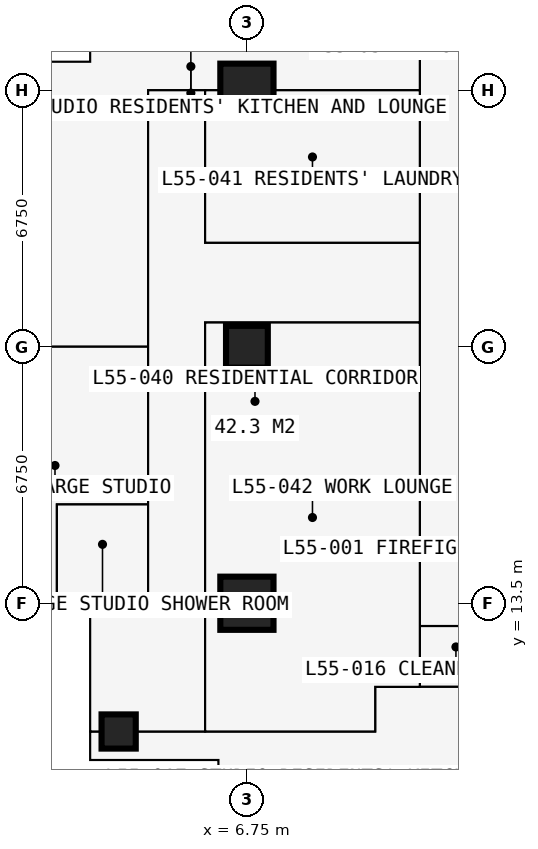
"""IFC4 building model, lengths in metres.
Left out: names, types, materials, properties, quantities, classifications, styles, units other than length and angle.
Written with IfcOpenShell. Run it as: python <this file> out.ifc"""

import sys

from ifc_helpers import new_model, si_unit, direction, frame, frame_2d, origin, origin_2d, place, context, subcontext, project, spatial, rectangle, extrude, element, fill, save


model = new_model("IFC4")
c1 = context("Model", 3, precision=1e-05, world=origin(), true_north=direction((0.0, 1.0)))
c2 = subcontext(c1, "Body", "Model", "MODEL_VIEW")
j1 = project(units=[si_unit("LENGTHUNIT", "METRE"), si_unit("PLANEANGLEUNIT", "RADIAN")], contexts=[c1])
p1 = place(None, origin())
s1 = spatial("IfcSite", under=j1, at=p1, CompositionType="ELEMENT")
p2 = place(p1, origin())
s2 = spatial("IfcBuilding", under=s1, at=p2, CompositionType="ELEMENT")
p3 = place(p2, frame((0.0, 0.0, 204.3)))
s3 = spatial("IfcBuildingStorey", under=s2, at=p3, CompositionType="ELEMENT", Elevation=204.3)
p4 = place(p3, frame((3.375, 10.125, 0.0), z_axis=(0.0, 0.0, 1.0), x_axis=(1.0, 0.0, 0.0)))
e1 = element("IfcColumn", 1, at=p4, inside=s3, PredefinedType="COLUMN", context=c2, shape_type="SweptSolid", body=[
    extrude(rectangle(XDim=0.9, YDim=0.9, at=origin_2d()), origin(), (0.0, 0.0, 1.0), 3.6),
])
p5 = place(p3, frame((6.75, 13.5, 0.0), z_axis=(0.0, 0.0, 1.0), x_axis=(1.0, 0.0, 0.0)))
e2 = element("IfcColumn", 2, at=p5, inside=s3, PredefinedType="COLUMN", context=c2, shape_type="SweptSolid", body=[
    extrude(rectangle(XDim=1.4, YDim=1.4, at=origin_2d()), origin(), (0.0, 0.0, 1.0), 3.6),
])
p6 = place(p3, frame((6.75, 20.25, 0.0), z_axis=(0.0, 0.0, 1.0), x_axis=(1.0, 0.0, 0.0)))
e3 = element("IfcColumn", 3, at=p6, inside=s3, PredefinedType="COLUMN", context=c2, shape_type="SweptSolid", body=[
    extrude(rectangle(XDim=1.1, YDim=1.1, at=origin_2d()), origin(), (0.0, 0.0, 1.0), 3.6),
])
p7 = place(p3, frame((6.75, 27.0, 0.0), z_axis=(0.0, 0.0, 1.0), x_axis=(1.0, 0.0, 0.0)))
e4 = element("IfcColumn", 4, at=p7, inside=s3, PredefinedType="COLUMN", context=c2, shape_type="SweptSolid", body=[
    extrude(rectangle(XDim=1.4, YDim=1.4, at=origin_2d()), origin(), (0.0, 0.0, 1.0), 3.6),
])
p8 = place(p3, frame((2.625, 31.125, 0.0), z_axis=(0.0, 0.0, 1.0), x_axis=(0.0, -1.0, 0.0)))
e5 = element("IfcWall", 5, at=p8, inside=s3, PredefinedType="SOLIDWALL", context=c2, shape_type="SweptSolid", body=[
    extrude(rectangle(XDim=3.375, YDim=0.3, at=frame_2d((1.688, 0.0))), origin(), (0.0, 0.0, 1.0), 3.375),
])
p9 = place(p8, frame((0.788, 0.0, 0.6)))
e6 = element("IfcOpeningElement", 6, at=p9, cuts=e5, PredefinedType="OPENING", context=c2, shape_type="SweptSolid", body=[
    extrude(rectangle(XDim=1.8, YDim=2.1, at=frame_2d((0.9, 1.05))), frame((0.0, 0.16, 0.0), z_axis=(0.0, -1.0, 0.0), x_axis=(1.0, 0.0, 0.0)), (0.0, 0.0, 1.0), 0.32),
])
p10 = place(p3, frame((2.625, 27.75, 0.0), z_axis=(0.0, 0.0, 1.0), x_axis=(-1.0, 0.0, 0.0)))
e7 = element("IfcWall", 7, at=p10, inside=s3, PredefinedType="SOLIDWALL", context=c2, shape_type="SweptSolid", body=[
    extrude(rectangle(XDim=3.375, YDim=0.3, at=frame_2d((1.688, 0.0))), origin(), (0.0, 0.0, 1.0), 3.375),
])
p11 = place(p10, frame((0.242, 0.0, 0.9)))
e8 = element("IfcOpeningElement", 8, at=p11, cuts=e7, PredefinedType="OPENING", context=c2, shape_type="SweptSolid", body=[
    extrude(rectangle(XDim=1.5, YDim=1.8, at=frame_2d((0.75, 0.9))), frame((0.0, 0.16, 0.0), z_axis=(0.0, -1.0, 0.0), x_axis=(1.0, 0.0, 0.0)), (0.0, 0.0, 1.0), 0.32),
])
p12 = place(p3, frame((-0.75, 12.75, 0.0), z_axis=(0.0, 0.0, 1.0), x_axis=(1.0, 0.0, 0.0)))
e9 = element("IfcWall", 9, at=p12, inside=s3, PredefinedType="SOLIDWALL", context=c2, shape_type="SweptSolid", body=[
    extrude(rectangle(XDim=3.375, YDim=0.3, at=frame_2d((1.688, 0.0))), origin(), (0.0, 0.0, 1.0), 3.375),
])
p13 = place(p12, frame((1.633, 0.0, 0.9)))
e10 = element("IfcOpeningElement", 10, at=p13, cuts=e9, PredefinedType="OPENING", context=c2, shape_type="SweptSolid", body=[
    extrude(rectangle(XDim=1.5, YDim=1.8, at=frame_2d((0.75, 0.9))), frame((0.0, 0.16, 0.0), z_axis=(0.0, -1.0, 0.0), x_axis=(1.0, 0.0, 0.0)), (0.0, 0.0, 1.0), 0.32),
])
p14 = place(p3, frame((2.625, 12.75, 0.0), z_axis=(0.0, 0.0, 1.0), x_axis=(0.0, -1.0, 0.0)))
e11 = element("IfcWall", 11, at=p14, inside=s3, PredefinedType="SOLIDWALL", context=c2, shape_type="SweptSolid", body=[
    extrude(rectangle(XDim=3.375, YDim=0.3, at=frame_2d((1.688, 0.0))), origin(), (0.0, 0.0, 1.0), 3.375),
])
p15 = place(p14, frame((0.788, 0.0, 0.6)))
e12 = element("IfcOpeningElement", 12, at=p15, cuts=e11, PredefinedType="OPENING", context=c2, shape_type="SweptSolid", body=[
    extrude(rectangle(XDim=1.8, YDim=2.1, at=frame_2d((0.9, 1.05))), frame((0.0, 0.16, 0.0), z_axis=(0.0, -1.0, 0.0), x_axis=(1.0, 0.0, 0.0)), (0.0, 0.0, 1.0), 0.32),
])
p16 = place(p3, frame((2.625, 9.375, 0.0), z_axis=(0.0, 0.0, 1.0), x_axis=(1.0, 0.0, 0.0)))
e13 = element("IfcWall", 13, at=p16, inside=s3, PredefinedType="SOLIDWALL", context=c2, shape_type="SweptSolid", body=[
    extrude(rectangle(XDim=3.375, YDim=0.3, at=frame_2d((1.688, 0.0))), origin(), (0.0, 0.0, 1.0), 3.375),
])
p17 = place(p16, frame((0.788, 0.0, 0.6)))
e14 = element("IfcOpeningElement", 14, at=p17, cuts=e13, PredefinedType="OPENING", context=c2, shape_type="SweptSolid", body=[
    extrude(rectangle(XDim=1.8, YDim=2.1, at=frame_2d((0.9, 1.05))), frame((0.0, 0.16, 0.0), z_axis=(0.0, -1.0, 0.0), x_axis=(1.0, 0.0, 0.0)), (0.0, 0.0, 1.0), 0.32),
])
p18 = place(p3, frame((6.0, 9.375, 0.0), z_axis=(0.0, 0.0, 1.0), x_axis=(0.0, -1.0, 0.0)))
e15 = element("IfcWall", 15, at=p18, inside=s3, PredefinedType="SOLIDWALL", context=c2, shape_type="SweptSolid", body=[
    extrude(rectangle(XDim=3.375, YDim=0.3, at=frame_2d((1.688, 0.0))), origin(), (0.0, 0.0, 1.0), 3.375),
])
p19 = place(p18, frame((0.788, 0.0, 0.6)))
e16 = element("IfcOpeningElement", 16, at=p19, cuts=e15, PredefinedType="OPENING", context=c2, shape_type="SweptSolid", body=[
    extrude(rectangle(XDim=1.8, YDim=2.1, at=frame_2d((0.9, 1.05))), frame((0.0, 0.16, 0.0), z_axis=(0.0, -1.0, 0.0), x_axis=(1.0, 0.0, 0.0)), (0.0, 0.0, 1.0), 0.32),
])
p20 = place(p3, frame((-0.734, 13.5, 0.0), z_axis=(0.0, 0.0, 1.0), x_axis=(1.0, 0.0, 0.0)))
e17 = element("IfcWall", 17, at=p20, inside=s3, PredefinedType="PARTITIONING", context=c2, shape_type="SweptSolid", body=[
    extrude(rectangle(XDim=4.884, YDim=0.175, at=frame_2d((2.442, 0.0))), origin(), (0.0, 0.0, 1.0), 2.877),
])
p21 = place(p3, frame((-0.734, 20.25, 0.0), z_axis=(0.0, 0.0, 1.0), x_axis=(1.0, 0.0, 0.0)))
e18 = element("IfcWall", 18, at=p21, inside=s3, PredefinedType="PARTITIONING", context=c2, shape_type="SweptSolid", body=[
    extrude(rectangle(XDim=4.884, YDim=0.15, at=frame_2d((2.442, 0.0))), origin(), (0.0, 0.0, 1.0), 2.877),
])
p22 = place(p3, frame((1.75, 13.5, 0.0), z_axis=(0.0, 0.0, 1.0), x_axis=(0.0, 1.0, 0.0)))
e19 = element("IfcWall", 19, at=p22, inside=s3, PredefinedType="PARTITIONING", context=c2, shape_type="SweptSolid", body=[
    extrude(rectangle(XDim=2.6, YDim=0.1, at=frame_2d((1.3, 0.0))), origin(), (0.0, 0.0, 1.0), 3.375),
])
p23 = place(p22, frame((0.85, 0.0, 0.0)))
e20 = element("IfcOpeningElement", 20, at=p23, cuts=e19, PredefinedType="OPENING", context=c2, shape_type="SweptSolid", body=[
    extrude(rectangle(XDim=0.9, YDim=2.2, at=frame_2d((0.45, 1.1))), frame((0.0, 0.06, 0.0), z_axis=(0.0, -1.0, 0.0), x_axis=(1.0, 0.0, 0.0)), (0.0, 0.0, 1.0), 0.12),
])
p24 = place(p3, frame((1.75, 16.1, 0.0), z_axis=(0.0, 0.0, 1.0), x_axis=(1.0, 0.0, 0.0)))
e21 = element("IfcWall", 21, at=p24, inside=s3, PredefinedType="PARTITIONING", context=c2, shape_type="SweptSolid", body=[
    extrude(rectangle(XDim=2.4, YDim=0.1, at=frame_2d((1.2, 0.0))), origin(), (0.0, 0.0, 1.0), 3.375),
])
p25 = place(p3, frame((2.625, 12.766, 0.0), z_axis=(0.0, 0.0, 1.0), x_axis=(0.0, 1.0, 0.0)))
e22 = element("IfcWall", 22, at=p25, inside=s3, PredefinedType="PARTITIONING", context=c2, shape_type="SweptSolid", body=[
    extrude(rectangle(XDim=0.734, YDim=0.15, at=frame_2d((0.367, 0.0))), origin(), (0.0, 0.0, 1.0), 3.375),
])
p26 = place(p3, frame((2.775, 10.125, 0.0), z_axis=(0.0, 0.0, 1.0), x_axis=(1.0, 0.0, 0.0)))
e23 = element("IfcWall", 23, at=p26, inside=s3, PredefinedType="PARTITIONING", context=c2, shape_type="SweptSolid", body=[
    extrude(rectangle(XDim=7.35, YDim=0.15, at=frame_2d((3.675, 0.0))), origin(), (0.0, 0.0, 1.0), 2.877),
])
p27 = place(p26, frame((1.066, 0.0, 0.0)))
e24 = element("IfcOpeningElement", 24, at=p27, cuts=e23, PredefinedType="OPENING", context=c2, shape_type="SweptSolid", body=[
    extrude(rectangle(XDim=1.0, YDim=2.2, at=frame_2d((0.5, 1.1))), frame((0.0, 0.085, 0.0), z_axis=(0.0, -1.0, 0.0), x_axis=(1.0, 0.0, 0.0)), (0.0, 0.0, 1.0), 0.17),
])
p28 = place(p3, frame((4.15, 13.5, 0.0), z_axis=(0.0, 0.0, 1.0), x_axis=(0.0, 1.0, 0.0)))
e25 = element("IfcWall", 25, at=p28, inside=s3, PredefinedType="PARTITIONING", context=c2, shape_type="SweptSolid", body=[
    extrude(rectangle(XDim=13.5, YDim=0.15, at=frame_2d((6.75, 0.0))), origin(), (0.0, 0.0, 1.0), 3.375),
])
p29 = place(p28, frame((4.2, 0.0, 0.0)))
e26 = element("IfcOpeningElement", 26, at=p29, cuts=e25, PredefinedType="OPENING", context=c2, shape_type="SweptSolid", body=[
    extrude(rectangle(XDim=0.95, YDim=2.2, at=frame_2d((0.475, 1.1))), frame((0.0, 0.085, 0.0), z_axis=(0.0, -1.0, 0.0), x_axis=(1.0, 0.0, 0.0)), (0.0, 0.0, 1.0), 0.17),
])
p30 = place(p3, frame((4.15, 27.0, 0.0), z_axis=(0.0, 0.0, 1.0), x_axis=(1.0, 0.0, 0.0)))
e27 = element("IfcWall", 27, at=p30, inside=s3, PredefinedType="PARTITIONING", context=c2, shape_type="SweptSolid", body=[
    extrude(rectangle(XDim=7.15, YDim=0.15, at=frame_2d((3.575, 0.0))), origin(), (0.0, 0.0, 1.0), 2.806),
])
p31 = place(p3, frame((5.65, 10.125, 0.0), z_axis=(0.0, 0.0, 1.0), x_axis=(0.0, 1.0, 0.0)))
e28 = element("IfcWall", 28, at=p31, inside=s3, PredefinedType="PARTITIONING", context=c2, shape_type="SweptSolid", body=[
    extrude(rectangle(XDim=10.762, YDim=0.15, at=frame_2d((5.381, 0.0))), origin(), (0.0, 0.0, 1.0), 3.375),
])
p32 = place(p31, frame((4.9, 0.0, 0.0)))
e29 = element("IfcOpeningElement", 29, at=p32, cuts=e28, PredefinedType="OPENING", context=c2, shape_type="SweptSolid", body=[
    extrude(rectangle(XDim=0.95, YDim=2.2, at=frame_2d((0.475, 1.1))), frame((0.0, 0.085, 0.0), z_axis=(0.0, -1.0, 0.0), x_axis=(1.0, 0.0, 0.0)), (0.0, 0.0, 1.0), 0.17),
])
p33 = place(p3, frame((5.65, 20.887, 0.0), z_axis=(0.0, 0.0, 1.0), x_axis=(1.0, 0.0, 0.0)))
e30 = element("IfcWall", 30, at=p33, inside=s3, PredefinedType="PARTITIONING", context=c2, shape_type="SweptSolid", body=[
    extrude(rectangle(XDim=5.65, YDim=0.15, at=frame_2d((2.825, 0.0))), origin(), (0.0, 0.0, 1.0), 3.375),
])
p34 = place(p3, frame((5.65, 22.988, 0.0), z_axis=(0.0, 0.0, 1.0), x_axis=(0.0, 1.0, 0.0)))
e31 = element("IfcWall", 31, at=p34, inside=s3, PredefinedType="PARTITIONING", context=c2, shape_type="SweptSolid", body=[
    extrude(rectangle(XDim=4.012, YDim=0.15, at=frame_2d((2.006, 0.0))), origin(), (0.0, 0.0, 1.0), 3.375),
])
p35 = place(p3, frame((5.65, 22.988, 0.0), z_axis=(0.0, 0.0, 1.0), x_axis=(1.0, 0.0, 0.0)))
e32 = element("IfcWall", 32, at=p35, inside=s3, PredefinedType="PARTITIONING", context=c2, shape_type="SweptSolid", body=[
    extrude(rectangle(XDim=5.65, YDim=0.15, at=frame_2d((2.825, 0.0))), origin(), (0.0, 0.0, 1.0), 3.375),
])
p36 = place(p35, frame((2.35, 0.0, 0.0)))
e33 = element("IfcOpeningElement", 33, at=p36, cuts=e32, PredefinedType="OPENING", context=c2, shape_type="SweptSolid", body=[
    extrude(rectangle(XDim=0.95, YDim=2.2, at=frame_2d((0.475, 1.1))), frame((0.0, 0.085, 0.0), z_axis=(0.0, -1.0, 0.0), x_axis=(1.0, 0.0, 0.0)), (0.0, 0.0, 1.0), 0.17),
])
p37 = place(p3, frame((10.125, 10.125, 0.0), z_axis=(0.0, 0.0, 1.0), x_axis=(0.0, 1.0, 0.0)))
e34 = element("IfcWall", 34, at=p37, inside=s3, PredefinedType="PARTITIONING", context=c2, shape_type="SweptSolid", body=[
    extrude(rectangle(XDim=1.175, YDim=0.15, at=frame_2d((0.587, 0.0))), origin(), (0.0, 0.0, 1.0), 3.375),
])
p38 = place(p3, frame((10.125, 11.3, 0.0), z_axis=(0.0, 0.0, 1.0), x_axis=(1.0, 0.0, 0.0)))
e35 = element("IfcWall", 35, at=p38, inside=s3, PredefinedType="PARTITIONING", context=c2, shape_type="SweptSolid", body=[
    extrude(rectangle(XDim=20.25, YDim=0.15, at=frame_2d((10.125, 0.0))), origin(), (0.0, 0.0, 1.0), 3.375),
])
p39 = place(p38, frame((11.725, 0.0, 0.0)))
e36 = element("IfcOpeningElement", 36, at=p39, cuts=e35, PredefinedType="OPENING", context=c2, shape_type="SweptSolid", body=[
    extrude(rectangle(XDim=0.95, YDim=2.2, at=frame_2d((0.475, 1.1))), frame((0.0, 0.085, 0.0), z_axis=(0.0, -1.0, 0.0), x_axis=(1.0, 0.0, 0.0)), (0.0, 0.0, 1.0), 0.17),
])
p40 = place(p38, frame((17.475, 0.0, 0.0)))
e37 = element("IfcOpeningElement", 37, at=p40, cuts=e35, PredefinedType="OPENING", context=c2, shape_type="SweptSolid", body=[
    extrude(rectangle(XDim=1.0, YDim=2.2, at=frame_2d((0.5, 1.1))), frame((0.0, 0.085, 0.0), z_axis=(0.0, -1.0, 0.0), x_axis=(1.0, 0.0, 0.0)), (0.0, 0.0, 1.0), 0.17),
])
p41 = place(p38, frame((7.95, 0.0, 0.0)))
e38 = element("IfcOpeningElement", 38, at=p41, cuts=e35, PredefinedType="OPENING", context=c2, shape_type="SweptSolid", body=[
    extrude(rectangle(XDim=0.95, YDim=2.2, at=frame_2d((0.475, 1.1))), frame((0.0, 0.085, 0.0), z_axis=(0.0, -1.0, 0.0), x_axis=(1.0, 0.0, 0.0)), (0.0, 0.0, 1.0), 0.17),
])
p42 = place(p3, frame((11.3, 11.3, 0.0), z_axis=(0.0, 0.0, 1.0), x_axis=(0.0, 1.0, 0.0)))
e39 = element("IfcWall", 39, at=p42, inside=s3, PredefinedType="PARTITIONING", context=c2, shape_type="SweptSolid", body=[
    extrude(rectangle(XDim=19.3, YDim=0.15, at=frame_2d((9.65, 0.0))), origin(), (0.0, 0.0, 1.0), 3.375),
])
p43 = place(p42, frame((18.1, 0.0, 0.0)))
e40 = element("IfcOpeningElement", 40, at=p43, cuts=e39, PredefinedType="OPENING", context=c2, shape_type="SweptSolid", body=[
    extrude(rectangle(XDim=1.0, YDim=2.2, at=frame_2d((0.5, 1.1))), frame((0.0, 0.085, 0.0), z_axis=(0.0, -1.0, 0.0), x_axis=(1.0, 0.0, 0.0)), (0.0, 0.0, 1.0), 0.17),
])
p44 = place(p42, frame((10.137, 0.0, 0.0)))
e41 = element("IfcOpeningElement", 41, at=p44, cuts=e39, PredefinedType="OPENING", context=c2, shape_type="SweptSolid", body=[
    extrude(rectangle(XDim=1.0, YDim=2.2, at=frame_2d((0.5, 1.1))), frame((0.0, 0.085, 0.0), z_axis=(0.0, -1.0, 0.0), x_axis=(1.0, 0.0, 0.0)), (0.0, 0.0, 1.0), 0.17),
])
p45 = place(p3, frame((11.3, 12.9, 0.0), z_axis=(0.0, 0.0, 1.0), x_axis=(1.0, 0.0, 0.0)))
e42 = element("IfcWall", 42, at=p45, inside=s3, PredefinedType="PARTITIONING", context=c2, shape_type="SweptSolid", body=[
    extrude(rectangle(XDim=1.9, YDim=0.15, at=frame_2d((0.95, 0.0))), origin(), (0.0, 0.0, 1.0), 2.806),
])
p46 = place(p45, frame((0.45, 0.0, 0.0)))
e43 = element("IfcOpeningElement", 43, at=p46, cuts=e42, PredefinedType="OPENING", context=c2, shape_type="SweptSolid", body=[
    extrude(rectangle(XDim=0.95, YDim=2.2, at=frame_2d((0.475, 1.1))), frame((0.0, 0.085, 0.0), z_axis=(0.0, -1.0, 0.0), x_axis=(1.0, 0.0, 0.0)), (0.0, 0.0, 1.0), 0.17),
])
p47 = place(p11, origin())
e44 = element("IfcWindow", 44, at=p47, inside=s3, PartitioningType="SINGLE_PANEL", PredefinedType="WINDOW", context=c2, shape_type="SweptSolid", body=[
    extrude(rectangle(XDim=1.5, YDim=1.8, at=frame_2d((0.75, 0.9))), frame((0.0, 0.03, 0.0), z_axis=(0.0, -1.0, 0.0), x_axis=(1.0, 0.0, 0.0)), (0.0, 0.0, 1.0), 0.06),
])
fill(e8, e44)
p48 = place(p13, origin())
e45 = element("IfcWindow", 45, at=p48, inside=s3, PartitioningType="SINGLE_PANEL", PredefinedType="WINDOW", context=c2, shape_type="SweptSolid", body=[
    extrude(rectangle(XDim=1.5, YDim=1.8, at=frame_2d((0.75, 0.9))), frame((0.0, 0.03, 0.0), z_axis=(0.0, -1.0, 0.0), x_axis=(1.0, 0.0, 0.0)), (0.0, 0.0, 1.0), 0.06),
])
fill(e10, e45)
p49 = place(p15, origin())
e46 = element("IfcWindow", 46, at=p49, inside=s3, PartitioningType="SINGLE_PANEL", PredefinedType="WINDOW", context=c2, shape_type="SweptSolid", body=[
    extrude(rectangle(XDim=1.8, YDim=2.1, at=frame_2d((0.9, 1.05))), frame((0.0, 0.03, 0.0), z_axis=(0.0, -1.0, 0.0), x_axis=(1.0, 0.0, 0.0)), (0.0, 0.0, 1.0), 0.06),
])
fill(e12, e46)
p50 = place(p17, origin())
e47 = element("IfcWindow", 47, at=p50, inside=s3, PartitioningType="SINGLE_PANEL", PredefinedType="WINDOW", context=c2, shape_type="SweptSolid", body=[
    extrude(rectangle(XDim=1.8, YDim=2.1, at=frame_2d((0.9, 1.05))), frame((0.0, 0.03, 0.0), z_axis=(0.0, -1.0, 0.0), x_axis=(1.0, 0.0, 0.0)), (0.0, 0.0, 1.0), 0.06),
])
fill(e14, e47)
p51 = place(p46, origin())
e48 = element("IfcDoor", 48, at=p51, inside=s3, OperationType="SINGLE_SWING_LEFT", PredefinedType="DOOR", context=c2, shape_type="SweptSolid", body=[
    extrude(rectangle(XDim=0.95, YDim=2.2, at=frame_2d((0.475, 1.1))), frame((0.0, 0.025, 0.0), z_axis=(0.0, -1.0, 0.0), x_axis=(1.0, 0.0, 0.0)), (0.0, 0.0, 1.0), 0.05),
])
fill(e43, e48)
p52 = place(p27, origin())
e49 = element("IfcDoor", 49, at=p52, inside=s3, OperationType="SINGLE_SWING_LEFT", PredefinedType="DOOR", context=c2, shape_type="SweptSolid", body=[
    extrude(rectangle(XDim=1.0, YDim=2.2, at=frame_2d((0.5, 1.1))), frame((0.0, 0.025, 0.0), z_axis=(0.0, -1.0, 0.0), x_axis=(1.0, 0.0, 0.0)), (0.0, 0.0, 1.0), 0.05),
])
fill(e24, e49)
p53 = place(p29, origin())
e50 = element("IfcDoor", 50, at=p53, inside=s3, OperationType="SINGLE_SWING_LEFT", PredefinedType="DOOR", context=c2, shape_type="SweptSolid", body=[
    extrude(rectangle(XDim=0.95, YDim=2.2, at=frame_2d((0.475, 1.1))), frame((0.0, 0.025, 0.0), z_axis=(0.0, -1.0, 0.0), x_axis=(1.0, 0.0, 0.0)), (0.0, 0.0, 1.0), 0.05),
])
fill(e26, e50)
p54 = place(p23, origin())
e51 = element("IfcDoor", 51, at=p54, inside=s3, OperationType="SINGLE_SWING_RIGHT", PredefinedType="DOOR", context=c2, shape_type="SweptSolid", body=[
    extrude(rectangle(XDim=0.9, YDim=2.2, at=frame_2d((0.45, 1.1))), frame((0.0, 0.025, 0.0), z_axis=(0.0, -1.0, 0.0), x_axis=(1.0, 0.0, 0.0)), (0.0, 0.0, 1.0), 0.05),
])
fill(e20, e51)
p55 = place(p44, origin())
e52 = element("IfcDoor", 52, at=p55, inside=s3, OperationType="SINGLE_SWING_LEFT", PredefinedType="DOOR", context=c2, shape_type="SweptSolid", body=[
    extrude(rectangle(XDim=1.0, YDim=2.2, at=frame_2d((0.5, 1.1))), frame((0.0, 0.025, 0.0), z_axis=(0.0, -1.0, 0.0), x_axis=(1.0, 0.0, 0.0)), (0.0, 0.0, 1.0), 0.05),
])
fill(e41, e52)
p56 = place(p36, origin())
e53 = element("IfcDoor", 53, at=p56, inside=s3, OperationType="SINGLE_SWING_LEFT", PredefinedType="DOOR", context=c2, shape_type="SweptSolid", body=[
    extrude(rectangle(XDim=0.95, YDim=2.2, at=frame_2d((0.475, 1.1))), frame((0.0, 0.025, 0.0), z_axis=(0.0, -1.0, 0.0), x_axis=(1.0, 0.0, 0.0)), (0.0, 0.0, 1.0), 0.05),
])
fill(e33, e53)
p57 = place(p32, origin())
e54 = element("IfcDoor", 54, at=p57, inside=s3, OperationType="SINGLE_SWING_LEFT", PredefinedType="DOOR", context=c2, shape_type="SweptSolid", body=[
    extrude(rectangle(XDim=0.95, YDim=2.2, at=frame_2d((0.475, 1.1))), frame((0.0, 0.025, 0.0), z_axis=(0.0, -1.0, 0.0), x_axis=(1.0, 0.0, 0.0)), (0.0, 0.0, 1.0), 0.05),
])
fill(e29, e54)
save(model, sys.argv[1])
